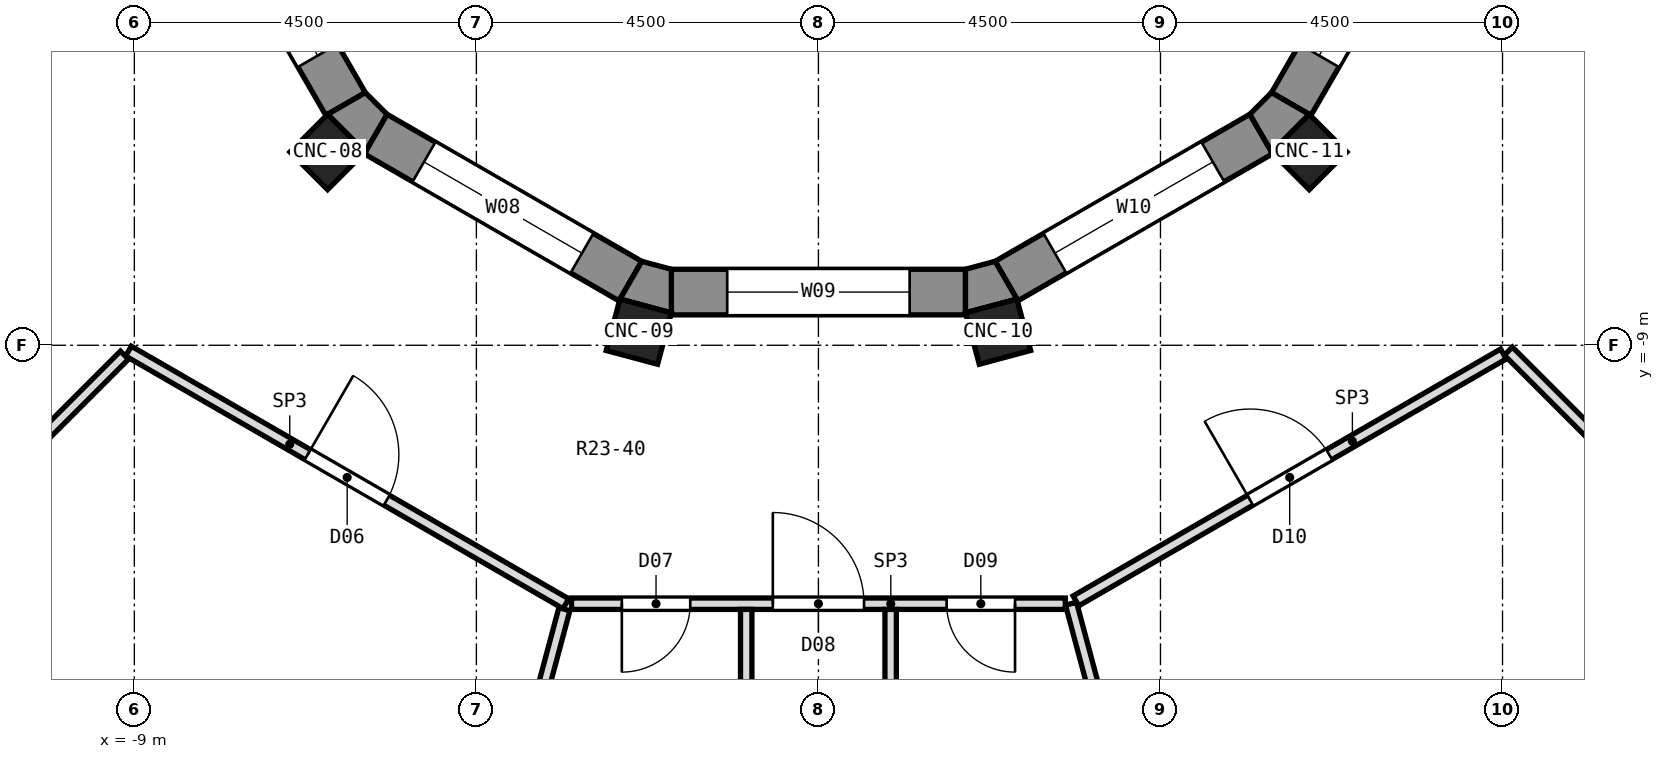
"""IFC4 building model, lengths in metres.
Left out: names, types, materials, properties, quantities, classifications, styles, units other than length and angle.
Written with IfcOpenShell. Run it as: python <this file> out.ifc"""

import sys

from ifc_helpers import new_model, si_unit, direction, frame, frame_2d, origin, origin_2d, place, context, subcontext, project, spatial, polyline, rectangle, outline, extrude, element, fill, save


model = new_model("IFC4")
c1 = context("Model", 3, precision=1e-05, world=origin(), true_north=direction((0.0, 1.0)))
c2 = subcontext(c1, "Body", "Model", "MODEL_VIEW")
j1 = project(units=[si_unit("LENGTHUNIT", "METRE"), si_unit("PLANEANGLEUNIT", "RADIAN")], contexts=[c1])
p1 = place(None, origin())
s1 = spatial("IfcSite", under=j1, at=p1, CompositionType="ELEMENT")
p2 = place(p1, origin())
s2 = spatial("IfcBuilding", under=s1, at=p2, CompositionType="ELEMENT")
p3 = place(p2, frame((0.0, 0.0, 151.3)))
s3 = spatial("IfcBuildingStorey", under=s2, at=p3, CompositionType="ELEMENT", Elevation=151.3)
for number, where, z_axis, x_axis in (
    (1, (-6.458, -6.458, 0.0), (0.0, 0.0, 1.0), (-0.707, -0.707, 0.0)),
    (2, (-2.364, -8.821, 0.0), (0.0, 0.0, 1.0), (-0.259, -0.966, 0.0)),
    (3, (2.364, -8.821, 0.0), (0.0, 0.0, 1.0), (0.259, -0.966, 0.0)),
    (4, (6.458, -6.458, 0.0), (0.0, 0.0, 1.0), (0.707, -0.707, 0.0)),
):
    element("IfcColumn", number, at=place(p3, frame(where, z_axis=z_axis, x_axis=x_axis)), inside=s3, PredefinedType="COLUMN", context=c2, shape_type="SweptSolid", body=[
        extrude(rectangle(XDim=0.7, YDim=0.7, at=origin_2d()), origin(), (0.0, 0.0, 1.0), 4.5),
    ])
p4 = place(p3, frame((-8.156, -2.474, 0.0), z_axis=(0.0, 0.0, 1.0), x_axis=(0.500033728941, -0.866005929495, 0.0)))
e5 = element("IfcWall", 5, at=p4, inside=s3, PredefinedType="SOLIDWALL", context=c2, shape_type="SweptSolid", body=[
    extrude(rectangle(XDim=3.87, YDim=0.6, at=frame_2d((1.935, 0.0))), origin(), (0.0, 0.0, 1.0), 3.95),
])
p5 = place(p4, frame((0.735, 0.0, 1.5)))
e6 = element("IfcOpeningElement", 6, at=p5, cuts=e5, PredefinedType="OPENING", context=c2, shape_type="SweptSolid", body=[
    extrude(rectangle(XDim=2.4, YDim=2.0, at=frame_2d((1.2, 1.0))), frame((0.0, 0.312, 0.0), z_axis=(0.0, -1.0, 0.0), x_axis=(1.0, 0.0, 0.0)), (0.0, 0.0, 1.0), 0.624),
])
p6 = place(p3, frame((-5.826, -6.22, 0.0), z_axis=(0.0, 0.0, 1.0), x_axis=(0.866005929495, -0.500033728941, 0.0)))
e7 = element("IfcWall", 7, at=p6, inside=s3, PredefinedType="SOLIDWALL", context=c2, shape_type="SweptSolid", body=[
    extrude(rectangle(XDim=3.87, YDim=0.6, at=frame_2d((1.935, 0.0))), origin(), (0.0, 0.0, 1.0), 3.95),
])
p7 = place(p6, frame((0.735, 0.0, 1.5)))
e8 = element("IfcOpeningElement", 8, at=p7, cuts=e7, PredefinedType="OPENING", context=c2, shape_type="SweptSolid", body=[
    extrude(rectangle(XDim=2.4, YDim=2.0, at=frame_2d((1.2, 1.0))), frame((0.0, 0.312, 0.0), z_axis=(0.0, -1.0, 0.0), x_axis=(1.0, 0.0, 0.0)), (0.0, 0.0, 1.0), 0.624),
])
p8 = place(p3, frame((-1.935, -8.3, 0.0), z_axis=(0.0, 0.0, 1.0), x_axis=(1.0, 0.0, 0.0)))
e9 = element("IfcWall", 9, at=p8, inside=s3, PredefinedType="SOLIDWALL", context=c2, shape_type="SweptSolid", body=[
    extrude(rectangle(XDim=3.87, YDim=0.6, at=frame_2d((1.935, 0.0))), origin(), (0.0, 0.0, 1.0), 3.95),
])
p9 = place(p8, frame((0.735, 0.0, 1.5)))
e10 = element("IfcOpeningElement", 10, at=p9, cuts=e9, PredefinedType="OPENING", context=c2, shape_type="SweptSolid", body=[
    extrude(rectangle(XDim=2.4, YDim=2.0, at=frame_2d((1.2, 1.0))), frame((0.0, 0.312, 0.0), z_axis=(0.0, -1.0, 0.0), x_axis=(1.0, 0.0, 0.0)), (0.0, 0.0, 1.0), 0.624),
])
p10 = place(p3, frame((2.474, -8.156, 0.0), z_axis=(0.0, 0.0, 1.0), x_axis=(0.866005929495, 0.500033728941, 0.0)))
e11 = element("IfcWall", 11, at=p10, inside=s3, PredefinedType="SOLIDWALL", context=c2, shape_type="SweptSolid", body=[
    extrude(rectangle(XDim=3.87, YDim=0.6, at=frame_2d((1.935, 0.0))), origin(), (0.0, 0.0, 1.0), 3.95),
])
p11 = place(p10, frame((0.735, 0.0, 1.5)))
e12 = element("IfcOpeningElement", 12, at=p11, cuts=e11, PredefinedType="OPENING", context=c2, shape_type="SweptSolid", body=[
    extrude(rectangle(XDim=2.4, YDim=2.0, at=frame_2d((1.2, 1.0))), frame((0.0, 0.312, 0.0), z_axis=(0.0, -1.0, 0.0), x_axis=(1.0, 0.0, 0.0)), (0.0, 0.0, 1.0), 0.624),
])
p12 = place(p3, frame((6.22, -5.826, 0.0), z_axis=(0.0, 0.0, 1.0), x_axis=(0.500033728941, 0.866005929495, 0.0)))
e13 = element("IfcWall", 13, at=p12, inside=s3, PredefinedType="SOLIDWALL", context=c2, shape_type="SweptSolid", body=[
    extrude(rectangle(XDim=3.87, YDim=0.6, at=frame_2d((1.935, 0.0))), origin(), (0.0, 0.0, 1.0), 3.95),
])
p13 = place(p12, frame((0.735, 0.0, 1.5)))
e14 = element("IfcOpeningElement", 14, at=p13, cuts=e13, PredefinedType="OPENING", context=c2, shape_type="SweptSolid", body=[
    extrude(rectangle(XDim=2.4, YDim=2.0, at=frame_2d((1.2, 1.0))), frame((0.0, 0.312, 0.0), z_axis=(0.0, -1.0, 0.0), x_axis=(1.0, 0.0, 0.0)), (0.0, 0.0, 1.0), 0.624),
])
p14 = place(p3, origin())
e15 = element("IfcWall", 15, at=p14, inside=s3, PredefinedType="SOLIDWALL", context=c2, shape_type="SweptSolid", body=[
    extrude(outline(polyline([(-6.458, -5.962), (-5.962, -6.458), (-5.676, -5.961), (-5.961, -5.676), (-6.458, -5.962)])), origin(), (0.0, 0.0, 1.0), 3.95),
])
p15 = place(p3, origin())
e16 = element("IfcWall", 16, at=p15, inside=s3, PredefinedType="SOLIDWALL", context=c2, shape_type="SweptSolid", body=[
    extrude(outline(polyline([(-1.935, -8.573), (-1.935, -8.0), (-2.324, -7.896), (-2.611, -8.392), (-1.935, -8.573)])), origin(), (0.0, 0.0, 1.0), 3.95),
])
p16 = place(p3, origin())
e17 = element("IfcWall", 17, at=p16, inside=s3, PredefinedType="SOLIDWALL", context=c2, shape_type="SweptSolid", body=[
    extrude(outline(polyline([(2.611, -8.392), (2.324, -7.896), (1.935, -8.0), (1.935, -8.573), (2.611, -8.392)])), origin(), (0.0, 0.0, 1.0), 3.95),
])
p17 = place(p3, origin())
e18 = element("IfcWall", 18, at=p17, inside=s3, PredefinedType="SOLIDWALL", context=c2, shape_type="SweptSolid", body=[
    extrude(outline(polyline([(5.962, -6.458), (6.458, -5.962), (5.961, -5.676), (5.676, -5.961), (5.962, -6.458)])), origin(), (0.0, 0.0, 1.0), 3.95),
])
p18 = place(p3, frame((3.323, -12.4, 0.0), z_axis=(0.0, 0.0, 1.0), x_axis=(0.258769040429, -0.965939223614, 0.0)))
e19 = element("IfcWall", 19, at=p18, inside=s3, PredefinedType="PARTITIONING", context=c2, shape_type="SweptSolid", body=[
    extrude(rectangle(XDim=10.862, YDim=0.15, at=frame_2d((5.431, 0.0))), origin(), (0.0, 0.0, 1.0), 3.95),
])
p19 = place(p3, frame((9.077, -9.077, 0.0), z_axis=(0.0, 0.0, 1.0), x_axis=(0.707106781187, -0.707106781187, 0.0)))
e20 = element("IfcWall", 20, at=p19, inside=s3, PredefinedType="PARTITIONING", context=c2, shape_type="SweptSolid", body=[
    extrude(rectangle(XDim=5.72, YDim=0.15, at=frame_2d((2.86, 0.0))), origin(), (0.0, 0.0, 1.0), 3.95),
])
p20 = place(p3, frame((-9.077, -9.077, 0.0), z_axis=(0.0, 0.0, 1.0), x_axis=(0.865961614908, -0.500110469302, 0.0)))
e21 = element("IfcWall", 21, at=p20, inside=s3, PredefinedType="PARTITIONING", context=c2, shape_type="SweptSolid", body=[
    extrude(rectangle(XDim=6.645, YDim=0.15, at=frame_2d((3.322, 0.0))), origin(), (0.0, 0.0, 1.0), 3.95),
])
p21 = place(p20, frame((2.722, 0.0, 0.0)))
e22 = element("IfcOpeningElement", 22, at=p21, cuts=e21, PredefinedType="OPENING", context=c2, shape_type="SweptSolid", body=[
    extrude(rectangle(XDim=1.2, YDim=2.1, at=frame_2d((0.6, 1.05))), frame((0.0, 0.087, 0.0), z_axis=(0.0, -1.0, 0.0), x_axis=(1.0, 0.0, 0.0)), (0.0, 0.0, 1.0), 0.174),
])
p22 = place(p3, frame((-3.248, -12.4, 0.0), z_axis=(0.0, 0.0, 1.0), x_axis=(1.0, 0.0, 0.0)))
e23 = element("IfcWall", 23, at=p22, inside=s3, PredefinedType="PARTITIONING", context=c2, shape_type="SweptSolid", body=[
    extrude(rectangle(XDim=6.496, YDim=0.15, at=frame_2d((3.248, 0.0))), origin(), (0.0, 0.0, 1.0), 3.95),
])
p23 = place(p22, frame((0.662, 0.0, 0.0)))
e24 = element("IfcOpeningElement", 24, at=p23, cuts=e23, PredefinedType="OPENING", context=c2, shape_type="SweptSolid", body=[
    extrude(rectangle(XDim=0.9, YDim=2.1, at=frame_2d((0.45, 1.05))), frame((0.0, 0.087, 0.0), z_axis=(0.0, -1.0, 0.0), x_axis=(1.0, 0.0, 0.0)), (0.0, 0.0, 1.0), 0.174),
])
p24 = place(p22, frame((2.648, 0.0, 0.0)))
e25 = element("IfcOpeningElement", 25, at=p24, cuts=e23, PredefinedType="OPENING", context=c2, shape_type="SweptSolid", body=[
    extrude(rectangle(XDim=1.2, YDim=2.1, at=frame_2d((0.6, 1.05))), frame((0.0, 0.087, 0.0), z_axis=(0.0, -1.0, 0.0), x_axis=(1.0, 0.0, 0.0)), (0.0, 0.0, 1.0), 0.174),
])
p25 = place(p22, frame((4.935, 0.0, 0.0)))
e26 = element("IfcOpeningElement", 26, at=p25, cuts=e23, PredefinedType="OPENING", context=c2, shape_type="SweptSolid", body=[
    extrude(rectangle(XDim=0.9, YDim=2.1, at=frame_2d((0.45, 1.05))), frame((0.0, 0.087, 0.0), z_axis=(0.0, -1.0, 0.0), x_axis=(1.0, 0.0, 0.0)), (0.0, 0.0, 1.0), 0.174),
])
p26 = place(p3, frame((3.388, -12.363, 0.0), z_axis=(0.0, 0.0, 1.0), x_axis=(0.865967095912, 0.5001009786, 0.0)))
e27 = element("IfcWall", 27, at=p26, inside=s3, PredefinedType="PARTITIONING", context=c2, shape_type="SweptSolid", body=[
    extrude(rectangle(XDim=6.495, YDim=0.15, at=frame_2d((3.248, 0.0))), origin(), (0.0, 0.0, 1.0), 3.95),
])
p27 = place(p26, frame((2.647, 0.0, 0.0)))
e28 = element("IfcOpeningElement", 28, at=p27, cuts=e27, PredefinedType="OPENING", context=c2, shape_type="SweptSolid", body=[
    extrude(rectangle(XDim=1.2, YDim=2.1, at=frame_2d((0.6, 1.05))), frame((0.0, 0.087, 0.0), z_axis=(0.0, -1.0, 0.0), x_axis=(1.0, 0.0, 0.0)), (0.0, 0.0, 1.0), 0.174),
])
p28 = place(p3, frame((-13.15, -13.15, 0.0), z_axis=(0.0, 0.0, 1.0), x_axis=(0.707106781187, 0.707106781187, 0.0)))
e29 = element("IfcWall", 29, at=p28, inside=s3, PredefinedType="PARTITIONING", context=c2, shape_type="SweptSolid", body=[
    extrude(rectangle(XDim=5.685, YDim=0.15, at=frame_2d((2.843, 0.0))), origin(), (0.0, 0.0, 1.0), 3.95),
])
p29 = place(p3, frame((-6.134, -22.892, 0.0), z_axis=(0.0, 0.0, 1.0), x_axis=(0.258802076295, 0.965930372908, 0.0)))
e30 = element("IfcWall", 30, at=p29, inside=s3, PredefinedType="PARTITIONING", context=c2, shape_type="SweptSolid", body=[
    extrude(rectangle(XDim=10.787, YDim=0.15, at=frame_2d((5.394, 0.0))), origin(), (0.0, 0.0, 1.0), 3.95),
])
for number, where, z_axis, x_axis in (
    (31, (0.95, -17.28, 0.0), (0.0, 0.0, 1.0), (0.0, 1.0, 0.0)),
    (32, (-0.95, -17.28, 0.0), (0.0, 0.0, 1.0), (0.0, 1.0, 0.0)),
):
    element("IfcWall", number, at=place(p3, frame(where, z_axis=z_axis, x_axis=x_axis)), inside=s3, PredefinedType="PARTITIONING", context=c2, shape_type="SweptSolid", body=[
        extrude(rectangle(XDim=4.805, YDim=0.15, at=frame_2d((2.402, 0.0))), origin(), (0.0, 0.0, 1.0), 3.95),
    ])
p30 = place(p5, origin())
e33 = element("IfcWindow", 33, at=p30, inside=s3, PartitioningType="SINGLE_PANEL", PredefinedType="WINDOW", context=c2, shape_type="SweptSolid", body=[
    extrude(rectangle(XDim=2.4, YDim=2.0, at=frame_2d((1.2, 1.0))), frame((0.0, -0.12, 0.0), z_axis=(0.0, -1.0, 0.0), x_axis=(1.0, 0.0, 0.0)), (0.0, 0.0, 1.0), 0.06),
])
fill(e6, e33)
p31 = place(p7, origin())
e34 = element("IfcWindow", 34, at=p31, inside=s3, PartitioningType="SINGLE_PANEL", PredefinedType="WINDOW", context=c2, shape_type="SweptSolid", body=[
    extrude(rectangle(XDim=2.4, YDim=2.0, at=frame_2d((1.2, 1.0))), frame((0.0, -0.12, 0.0), z_axis=(0.0, -1.0, 0.0), x_axis=(1.0, 0.0, 0.0)), (0.0, 0.0, 1.0), 0.06),
])
fill(e8, e34)
p32 = place(p9, origin())
e35 = element("IfcWindow", 35, at=p32, inside=s3, PartitioningType="SINGLE_PANEL", PredefinedType="WINDOW", context=c2, shape_type="SweptSolid", body=[
    extrude(rectangle(XDim=2.4, YDim=2.0, at=frame_2d((1.2, 1.0))), frame((0.0, -0.12, 0.0), z_axis=(0.0, -1.0, 0.0), x_axis=(1.0, 0.0, 0.0)), (0.0, 0.0, 1.0), 0.06),
])
fill(e10, e35)
p33 = place(p11, origin())
e36 = element("IfcWindow", 36, at=p33, inside=s3, PartitioningType="SINGLE_PANEL", PredefinedType="WINDOW", context=c2, shape_type="SweptSolid", body=[
    extrude(rectangle(XDim=2.4, YDim=2.0, at=frame_2d((1.2, 1.0))), frame((0.0, -0.12, 0.0), z_axis=(0.0, -1.0, 0.0), x_axis=(1.0, 0.0, 0.0)), (0.0, 0.0, 1.0), 0.06),
])
fill(e12, e36)
p34 = place(p13, origin())
e37 = element("IfcWindow", 37, at=p34, inside=s3, PartitioningType="SINGLE_PANEL", PredefinedType="WINDOW", context=c2, shape_type="SweptSolid", body=[
    extrude(rectangle(XDim=2.4, YDim=2.0, at=frame_2d((1.2, 1.0))), frame((0.0, -0.12, 0.0), z_axis=(0.0, -1.0, 0.0), x_axis=(1.0, 0.0, 0.0)), (0.0, 0.0, 1.0), 0.06),
])
fill(e14, e37)
p35 = place(p21, origin())
e38 = element("IfcDoor", 38, at=p35, inside=s3, OperationType="SINGLE_SWING_LEFT", PredefinedType="DOOR", context=c2, shape_type="SweptSolid", body=[
    extrude(rectangle(XDim=1.2, YDim=2.1, at=frame_2d((0.6, 1.05))), frame((0.0, 0.025, 0.0), z_axis=(0.0, -1.0, 0.0), x_axis=(1.0, 0.0, 0.0)), (0.0, 0.0, 1.0), 0.05),
])
fill(e22, e38)
p36 = place(p23, frame((0.9, 0.0, 0.0), z_axis=(0.0, 0.0, 1.0), x_axis=(-1.0, 0.0, 0.0)))
e39 = element("IfcDoor", 39, at=p36, inside=s3, OperationType="SINGLE_SWING_RIGHT", PredefinedType="DOOR", context=c2, shape_type="SweptSolid", body=[
    extrude(rectangle(XDim=0.9, YDim=2.1, at=frame_2d((0.45, 1.05))), frame((0.0, 0.025, 0.0), z_axis=(0.0, -1.0, 0.0), x_axis=(1.0, 0.0, 0.0)), (0.0, 0.0, 1.0), 0.05),
])
fill(e24, e39)
p37 = place(p24, origin())
e40 = element("IfcDoor", 40, at=p37, inside=s3, OperationType="SINGLE_SWING_LEFT", PredefinedType="DOOR", context=c2, shape_type="SweptSolid", body=[
    extrude(rectangle(XDim=1.2, YDim=2.1, at=frame_2d((0.6, 1.05))), frame((0.0, 0.025, 0.0), z_axis=(0.0, -1.0, 0.0), x_axis=(1.0, 0.0, 0.0)), (0.0, 0.0, 1.0), 0.05),
])
fill(e25, e40)
p38 = place(p25, frame((0.9, 0.0, 0.0), z_axis=(0.0, 0.0, 1.0), x_axis=(-1.0, 0.0, 0.0)))
e41 = element("IfcDoor", 41, at=p38, inside=s3, OperationType="SINGLE_SWING_LEFT", PredefinedType="DOOR", context=c2, shape_type="SweptSolid", body=[
    extrude(rectangle(XDim=0.9, YDim=2.1, at=frame_2d((0.45, 1.05))), frame((0.0, 0.025, 0.0), z_axis=(0.0, -1.0, 0.0), x_axis=(1.0, 0.0, 0.0)), (0.0, 0.0, 1.0), 0.05),
])
fill(e26, e41)
p39 = place(p27, origin())
e42 = element("IfcDoor", 42, at=p39, inside=s3, OperationType="SINGLE_SWING_LEFT", PredefinedType="DOOR", context=c2, shape_type="SweptSolid", body=[
    extrude(rectangle(XDim=1.2, YDim=2.1, at=frame_2d((0.6, 1.05))), frame((0.0, 0.025, 0.0), z_axis=(0.0, -1.0, 0.0), x_axis=(1.0, 0.0, 0.0)), (0.0, 0.0, 1.0), 0.05),
])
fill(e28, e42)
save(model, sys.argv[1])
